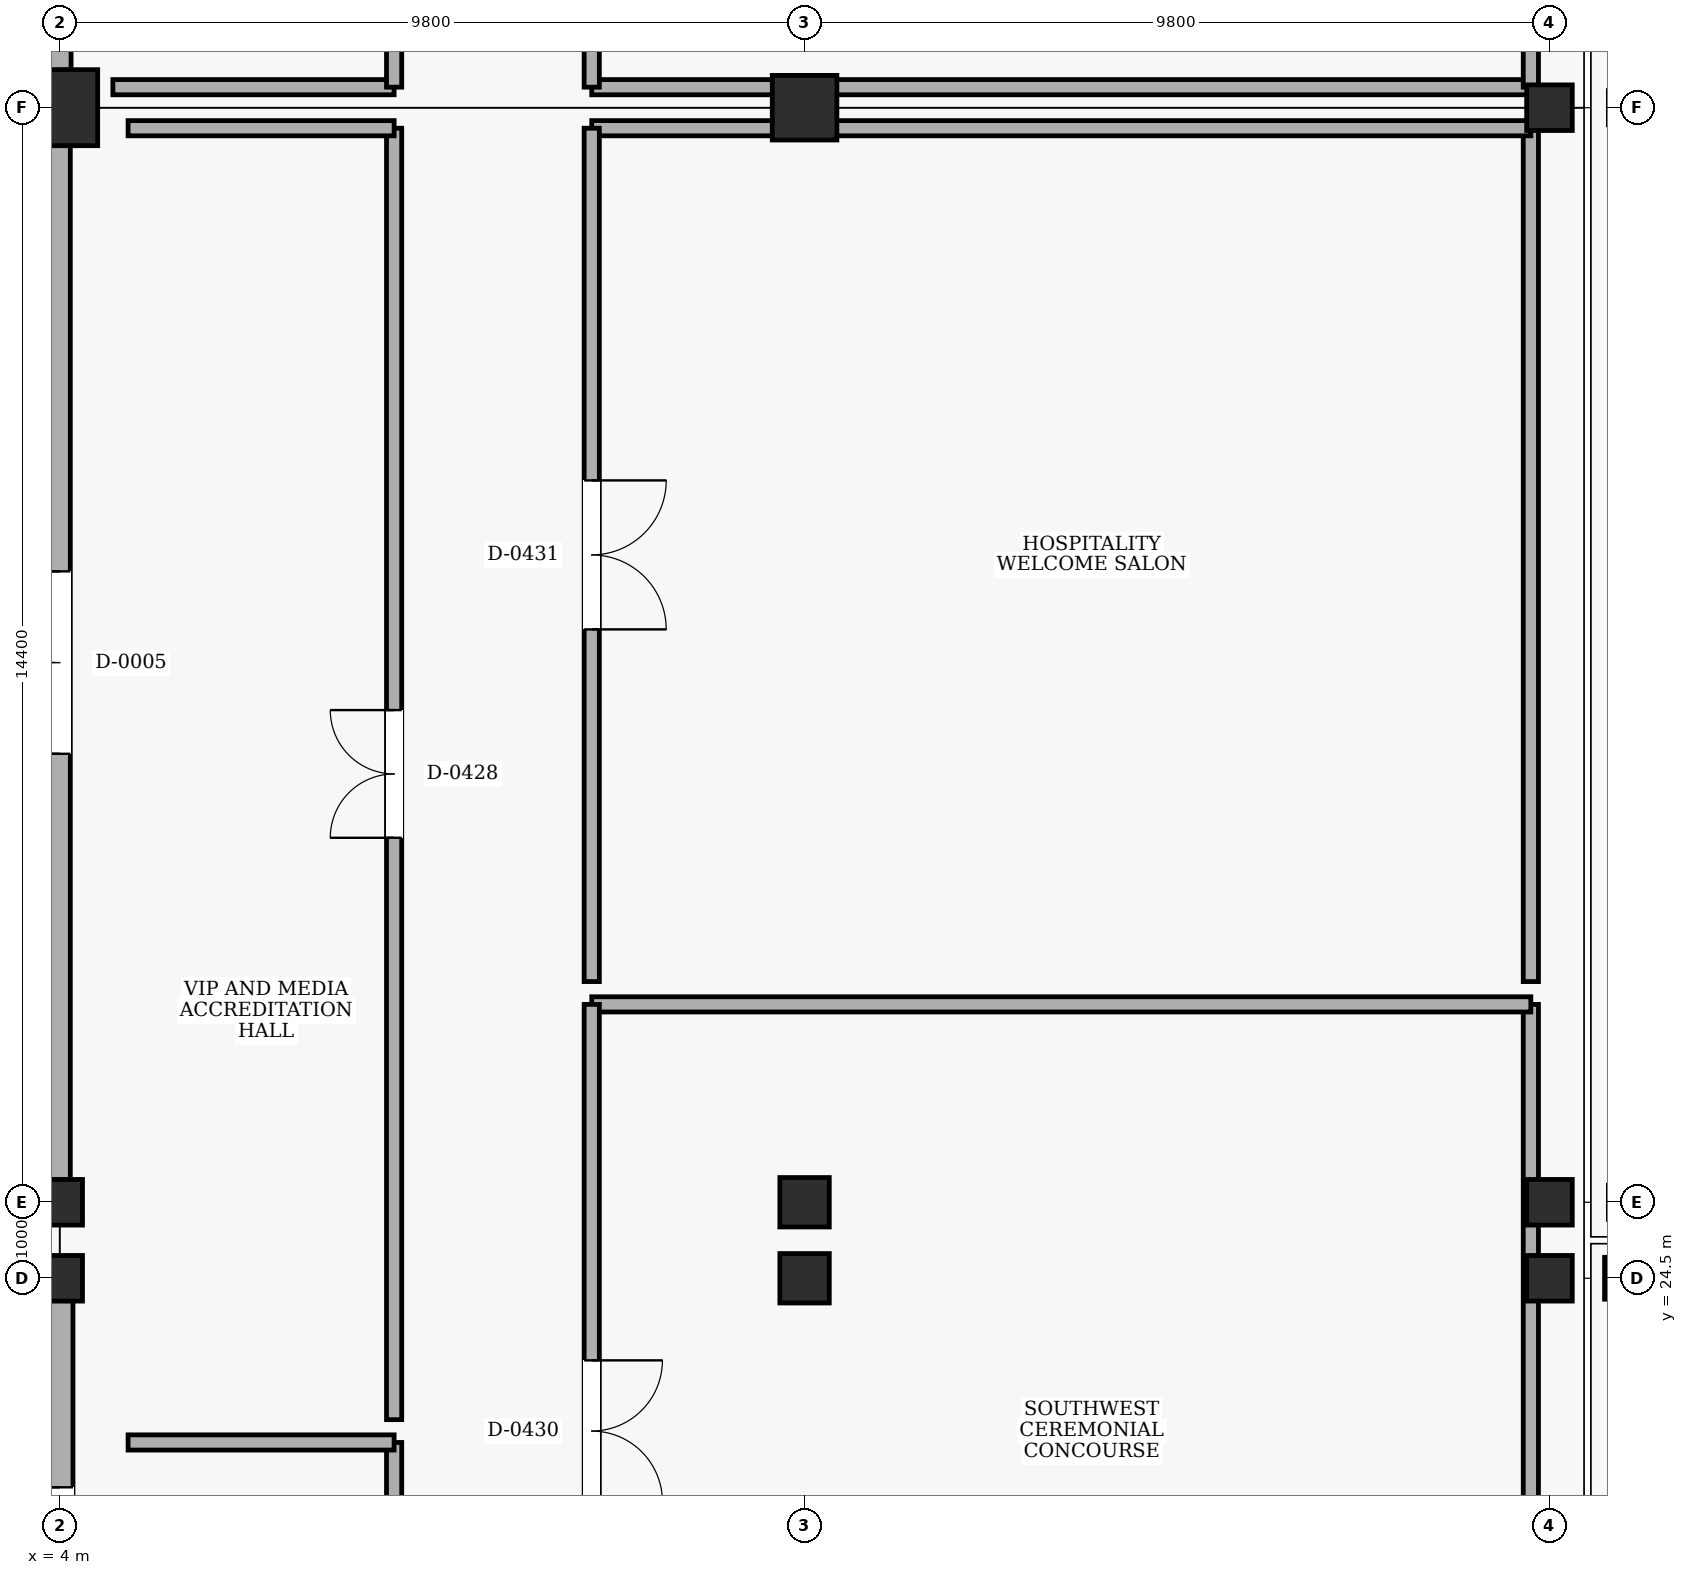
"""IFC4 building model, lengths in metres.
Left out: names, types, materials, properties, quantities, classifications, styles, units other than length and angle.
Written with IfcOpenShell. Run it as: python <this file> out.ifc"""

import sys

from ifc_helpers import new_model, si_unit, direction, frame, frame_2d, origin, origin_2d, place, context, subcontext, project, spatial, rectangle, extrude, element, fill, save


model = new_model("IFC4")
c1 = context("Model", 3, precision=1e-05, world=origin(), true_north=direction((0.0, 1.0)))
c2 = subcontext(c1, "Body", "Model", "MODEL_VIEW")
j1 = project(units=[si_unit("LENGTHUNIT", "METRE"), si_unit("PLANEANGLEUNIT", "RADIAN")], contexts=[c1])
p1 = place(None, origin())
s1 = spatial("IfcSite", under=j1, at=p1, CompositionType="ELEMENT")
p2 = place(p1, origin())
s2 = spatial("IfcBuilding", under=s1, at=p2, CompositionType="ELEMENT")
p3 = place(p2, origin())
s3 = spatial("IfcBuildingStorey", under=s2, at=p3, CompositionType="ELEMENT", Elevation=0.0)
for number, where, z_axis, x_axis in (
    (1, (4.0, 24.5, 0.0), (0.0, 0.0, 1.0), (1.0, 0.0, 0.0)),
    (2, (4.0, 25.5, 0.0), (0.0, 0.0, 1.0), (1.0, 0.0, 0.0)),
):
    element("IfcColumn", number, at=place(p3, frame(where, z_axis=z_axis, x_axis=x_axis)), inside=s3, PredefinedType="COLUMN", context=c2, shape_type="SweptSolid", body=[
        extrude(rectangle(XDim=0.6, YDim=0.6, at=origin_2d()), origin(), (0.0, 0.0, 1.0), 5.4),
    ])
p4 = place(p3, frame((4.0, 39.9, 0.0), z_axis=(0.0, 0.0, 1.0), x_axis=(1.0, 0.0, 0.0)))
e3 = element("IfcColumn", 3, at=p4, inside=s3, PredefinedType="COLUMN", context=c2, shape_type="SweptSolid", body=[
    extrude(rectangle(XDim=1.0, YDim=1.0, at=origin_2d()), origin(), (0.0, 0.0, 1.0), 5.4),
])
for number, where, z_axis, x_axis in (
    (4, (13.8, 24.5, 0.0), (0.0, 0.0, 1.0), (1.0, 0.0, 0.0)),
    (5, (13.8, 25.5, 0.0), (0.0, 0.0, 1.0), (1.0, 0.0, 0.0)),
):
    element("IfcColumn", number, at=place(p3, frame(where, z_axis=z_axis, x_axis=x_axis)), inside=s3, PredefinedType="COLUMN", context=c2, shape_type="SweptSolid", body=[
        extrude(rectangle(XDim=0.65, YDim=0.65, at=origin_2d()), origin(), (0.0, 0.0, 1.0), 5.4),
    ])
p5 = place(p3, frame((13.8, 39.9, 0.0), z_axis=(0.0, 0.0, 1.0), x_axis=(1.0, 0.0, 0.0)))
e6 = element("IfcColumn", 6, at=p5, inside=s3, PredefinedType="COLUMN", context=c2, shape_type="SweptSolid", body=[
    extrude(rectangle(XDim=0.85, YDim=0.85, at=origin_2d()), origin(), (0.0, 0.0, 1.0), 5.4),
])
for number, where, z_axis, x_axis in (
    (7, (23.6, 24.5, 0.0), (0.0, 0.0, 1.0), (1.0, 0.0, 0.0)),
    (8, (23.6, 25.5, 0.0), (0.0, 0.0, 1.0), (1.0, 0.0, 0.0)),
    (9, (23.6, 39.9, 0.0), (0.0, 0.0, 1.0), (1.0, 0.0, 0.0)),
):
    element("IfcColumn", number, at=place(p3, frame(where, z_axis=z_axis, x_axis=x_axis)), inside=s3, PredefinedType="COLUMN", context=c2, shape_type="SweptSolid", body=[
        extrude(rectangle(XDim=0.6, YDim=0.6, at=origin_2d()), origin(), (0.0, 0.0, 1.0), 5.4),
    ])
p6 = place(p3, frame((24.6, 24.5, 0.0), z_axis=(0.0, 0.0, 1.0), x_axis=(1.0, 0.0, 0.0)))
e10 = element("IfcColumn", 10, at=p6, inside=s3, PredefinedType="COLUMN", context=c2, shape_type="SweptSolid", body=[
    extrude(rectangle(XDim=0.55, YDim=0.55, at=origin_2d()), origin(), (0.0, 0.0, 1.0), 5.4),
])
p7 = place(p3, frame((4.0, 16.895, 0.0), z_axis=(0.0, 0.0, 1.0), x_axis=(0.0, 1.0, 0.0)))
e11 = element("IfcWall", 11, at=p7, inside=s3, PredefinedType="SOLIDWALL", context=c2, shape_type="SweptSolid", body=[
    extrude(rectangle(XDim=7.31, YDim=0.35, at=frame_2d((3.655, 0.0))), origin(), (0.0, 0.0, 1.0), 4.26),
])
p8 = place(p7, frame((2.455, 0.0, 0.0)))
e12 = element("IfcOpeningElement", 12, at=p8, cuts=e11, PredefinedType="OPENING", context=c2, shape_type="SweptSolid", body=[
    extrude(rectangle(XDim=2.4, YDim=2.2, at=frame_2d((1.2, 1.1))), frame((0.0, 0.185, 0.0), z_axis=(0.0, -1.0, 0.0), x_axis=(1.0, 0.0, 0.0)), (0.0, 0.0, 1.0), 0.37),
])
p9 = place(p3, frame((4.0, 25.795, 0.0), z_axis=(0.0, 0.0, 1.0), x_axis=(0.0, 1.0, 0.0)))
e13 = element("IfcWall", 13, at=p9, inside=s3, PredefinedType="SOLIDWALL", context=c2, shape_type="SweptSolid", body=[
    extrude(rectangle(XDim=13.61, YDim=0.28, at=frame_2d((6.805, 0.0))), origin(), (0.0, 0.0, 1.0), 4.61),
])
p10 = place(p9, frame((5.605, 0.0, 0.0)))
e14 = element("IfcOpeningElement", 14, at=p10, cuts=e13, PredefinedType="OPENING", context=c2, shape_type="SweptSolid", body=[
    extrude(rectangle(XDim=2.4, YDim=2.2, at=frame_2d((1.2, 1.1))), frame((0.0, 0.15, 0.0), z_axis=(0.0, -1.0, 0.0), x_axis=(1.0, 0.0, 0.0)), (0.0, 0.0, 1.0), 0.3),
])
p11 = place(p3, frame((4.0, 40.395, 0.0), z_axis=(0.0, 0.0, 1.0), x_axis=(0.0, 1.0, 0.0)))
e15 = element("IfcWall", 15, at=p11, inside=s3, PredefinedType="SOLIDWALL", context=c2, shape_type="SweptSolid", body=[
    extrude(rectangle(XDim=6.21, YDim=0.3, at=frame_2d((3.105, 0.0))), origin(), (0.0, 0.0, 1.0), 4.26),
])
p12 = place(p11, frame((1.905, 0.0, 0.0)))
e16 = element("IfcOpeningElement", 16, at=p12, cuts=e15, PredefinedType="OPENING", context=c2, shape_type="SweptSolid", body=[
    extrude(rectangle(XDim=2.4, YDim=2.2, at=frame_2d((1.2, 1.1))), frame((0.0, 0.16, 0.0), z_axis=(0.0, -1.0, 0.0), x_axis=(1.0, 0.0, 0.0)), (0.0, 0.0, 1.0), 0.32),
])
p13 = place(p3, frame((8.4, 5.35, 0.0), z_axis=(0.0, 0.0, 1.0), x_axis=(0.0, 1.0, 0.0)))
e17 = element("IfcWall", 17, at=p13, inside=s3, PredefinedType="PARTITIONING", context=c2, shape_type="SweptSolid", body=[
    extrude(rectangle(XDim=16.99, YDim=0.2, at=frame_2d((8.495, 0.0))), origin(), (0.0, 0.0, 1.0), 5.08),
])
p14 = place(p13, frame((7.72, 0.0, 0.0)))
e18 = element("IfcOpeningElement", 18, at=p14, cuts=e17, PredefinedType="OPENING", context=c2, shape_type="SweptSolid", body=[
    extrude(rectangle(XDim=1.55, YDim=2.2, at=frame_2d((0.775, 1.1))), frame((0.0, 0.11, 0.0), z_axis=(0.0, -1.0, 0.0), x_axis=(1.0, 0.0, 0.0)), (0.0, 0.0, 1.0), 0.22),
])
p15 = place(p3, frame((8.4, 22.34, 0.0), z_axis=(0.0, 0.0, 1.0), x_axis=(-1.0, 0.0, 0.0)))
e19 = element("IfcWall", 19, at=p15, inside=s3, PredefinedType="PARTITIONING", context=c2, shape_type="SweptSolid", body=[
    extrude(rectangle(XDim=3.5, YDim=0.2, at=frame_2d((1.75, 0.0))), origin(), (0.0, 0.0, 1.0), 5.08),
])
p16 = place(p3, frame((8.4, 22.64, 0.0), z_axis=(0.0, 0.0, 1.0), x_axis=(0.0, 1.0, 0.0)))
e20 = element("IfcWall", 20, at=p16, inside=s3, PredefinedType="PARTITIONING", context=c2, shape_type="SweptSolid", body=[
    extrude(rectangle(XDim=16.99, YDim=0.2, at=frame_2d((8.495, 0.0))), origin(), (0.0, 0.0, 1.0), 5.08),
])
p17 = place(p16, frame((7.655, 0.0, 0.0)))
e21 = element("IfcOpeningElement", 21, at=p17, cuts=e20, PredefinedType="OPENING", context=c2, shape_type="SweptSolid", body=[
    extrude(rectangle(XDim=1.68, YDim=2.25, at=frame_2d((0.84, 1.125))), frame((0.0, 0.11, 0.0), z_axis=(0.0, -1.0, 0.0), x_axis=(1.0, 0.0, 0.0)), (0.0, 0.0, 1.0), 0.22),
])
p18 = place(p3, frame((8.4, 39.63, 0.0), z_axis=(0.0, 0.0, 1.0), x_axis=(-1.0, 0.0, 0.0)))
e22 = element("IfcWall", 22, at=p18, inside=s3, PredefinedType="PARTITIONING", context=c2, shape_type="SweptSolid", body=[
    extrude(rectangle(XDim=3.5, YDim=0.2, at=frame_2d((1.75, 0.0))), origin(), (0.0, 0.0, 1.0), 4.21),
])
p19 = place(p3, frame((23.355, 16.877, 0.0), z_axis=(0.0, 0.0, 1.0), x_axis=(0.0, 1.0, 0.0)))
e23 = element("IfcWall", 23, at=p19, inside=s3, PredefinedType="PARTITIONING", context=c2, shape_type="SweptSolid", body=[
    extrude(rectangle(XDim=11.227, YDim=0.2, at=frame_2d((5.613, 0.0))), origin(), (0.0, 0.0, 1.0), 4.31),
])
p20 = place(p3, frame((23.355, 28.103, 0.0), z_axis=(0.0, 0.0, 1.0), x_axis=(-1.0, 0.0, 0.0)))
e24 = element("IfcWall", 24, at=p20, inside=s3, PredefinedType="PARTITIONING", context=c2, shape_type="SweptSolid", body=[
    extrude(rectangle(XDim=12.355, YDim=0.2, at=frame_2d((6.177, 0.0))), origin(), (0.0, 0.0, 1.0), 5.08),
])
p21 = place(p3, frame((11.0, 28.103, 0.0), z_axis=(0.0, 0.0, 1.0), x_axis=(0.0, -1.0, 0.0)))
e25 = element("IfcWall", 25, at=p21, inside=s3, PredefinedType="PARTITIONING", context=c2, shape_type="SweptSolid", body=[
    extrude(rectangle(XDim=11.227, YDim=0.2, at=frame_2d((5.613, 0.0))), origin(), (0.0, 0.0, 1.0), 5.08),
])
p22 = place(p21, frame((4.683, 0.0, 0.0)))
e26 = element("IfcOpeningElement", 26, at=p22, cuts=e25, PredefinedType="OPENING", context=c2, shape_type="SweptSolid", body=[
    extrude(rectangle(XDim=1.86, YDim=2.3, at=frame_2d((0.93, 1.15))), frame((0.0, 0.11, 0.0), z_axis=(0.0, -1.0, 0.0), x_axis=(1.0, 0.0, 0.0)), (0.0, 0.0, 1.0), 0.22),
])
p23 = place(p3, frame((23.355, 28.403, 0.0), z_axis=(0.0, 0.0, 1.0), x_axis=(0.0, 1.0, 0.0)))
e27 = element("IfcWall", 27, at=p23, inside=s3, PredefinedType="PARTITIONING", context=c2, shape_type="SweptSolid", body=[
    extrude(rectangle(XDim=11.227, YDim=0.2, at=frame_2d((5.613, 0.0))), origin(), (0.0, 0.0, 1.0), 4.61),
])
p24 = place(p3, frame((23.355, 39.63, 0.0), z_axis=(0.0, 0.0, 1.0), x_axis=(-1.0, 0.0, 0.0)))
e28 = element("IfcWall", 28, at=p24, inside=s3, PredefinedType="PARTITIONING", context=c2, shape_type="SweptSolid", body=[
    extrude(rectangle(XDim=12.355, YDim=0.2, at=frame_2d((6.177, 0.0))), origin(), (0.0, 0.0, 1.0), 4.21),
])
p25 = place(p3, frame((11.0, 39.63, 0.0), z_axis=(0.0, 0.0, 1.0), x_axis=(0.0, -1.0, 0.0)))
e29 = element("IfcWall", 29, at=p25, inside=s3, PredefinedType="PARTITIONING", context=c2, shape_type="SweptSolid", body=[
    extrude(rectangle(XDim=11.227, YDim=0.2, at=frame_2d((5.613, 0.0))), origin(), (0.0, 0.0, 1.0), 5.08),
])
p26 = place(p25, frame((4.633, 0.0, 0.0)))
e30 = element("IfcOpeningElement", 30, at=p26, cuts=e29, PredefinedType="OPENING", context=c2, shape_type="SweptSolid", body=[
    extrude(rectangle(XDim=1.96, YDim=2.3, at=frame_2d((0.98, 1.15))), frame((0.0, 0.11, 0.0), z_axis=(0.0, -1.0, 0.0), x_axis=(1.0, 0.0, 0.0)), (0.0, 0.0, 1.0), 0.22),
])
p27 = place(p3, frame((4.7, 40.17, 0.0), z_axis=(0.0, 0.0, 1.0), x_axis=(1.0, 0.0, 0.0)))
e31 = element("IfcWall", 31, at=p27, inside=s3, PredefinedType="PARTITIONING", context=c2, shape_type="SweptSolid", body=[
    extrude(rectangle(XDim=3.7, YDim=0.2, at=frame_2d((1.85, 0.0))), origin(), (0.0, 0.0, 1.0), 4.21),
])
p28 = place(p3, frame((8.4, 40.17, 0.0), z_axis=(0.0, 0.0, 1.0), x_axis=(0.0, 1.0, 0.0)))
e32 = element("IfcWall", 32, at=p28, inside=s3, PredefinedType="PARTITIONING", context=c2, shape_type="SweptSolid", body=[
    extrude(rectangle(XDim=9.05, YDim=0.2, at=frame_2d((4.525, 0.0))), origin(), (0.0, 0.0, 1.0), 5.08),
])
p29 = place(p28, frame((3.485, 0.0, 0.0)))
e33 = element("IfcOpeningElement", 33, at=p29, cuts=e32, PredefinedType="OPENING", context=c2, shape_type="SweptSolid", body=[
    extrude(rectangle(XDim=2.08, YDim=2.35, at=frame_2d((1.04, 1.175))), frame((0.0, 0.11, 0.0), z_axis=(0.0, -1.0, 0.0), x_axis=(1.0, 0.0, 0.0)), (0.0, 0.0, 1.0), 0.22),
])
p30 = place(p3, frame((11.0, 40.17, 0.0), z_axis=(0.0, 0.0, 1.0), x_axis=(1.0, 0.0, 0.0)))
e34 = element("IfcWall", 34, at=p30, inside=s3, PredefinedType="PARTITIONING", context=c2, shape_type="SweptSolid", body=[
    extrude(rectangle(XDim=12.355, YDim=0.2, at=frame_2d((6.177, 0.0))), origin(), (0.0, 0.0, 1.0), 4.21),
])
p31 = place(p3, frame((23.355, 40.17, 0.0), z_axis=(0.0, 0.0, 1.0), x_axis=(0.0, 1.0, 0.0)))
e35 = element("IfcWall", 35, at=p31, inside=s3, PredefinedType="PARTITIONING", context=c2, shape_type="SweptSolid", body=[
    extrude(rectangle(XDim=9.05, YDim=0.2, at=frame_2d((4.525, 0.0))), origin(), (0.0, 0.0, 1.0), 4.31),
])
p32 = place(p3, frame((11.0, 49.22, 0.0), z_axis=(0.0, 0.0, 1.0), x_axis=(0.0, -1.0, 0.0)))
e36 = element("IfcWall", 36, at=p32, inside=s3, PredefinedType="PARTITIONING", context=c2, shape_type="SweptSolid", body=[
    extrude(rectangle(XDim=9.05, YDim=0.2, at=frame_2d((4.525, 0.0))), origin(), (0.0, 0.0, 1.0), 5.08),
])
p33 = place(p8, origin())
e37 = element("IfcDoor", 37, at=p33, inside=s3, OperationType="DOUBLE_DOOR_SINGLE_SWING", PredefinedType="DOOR", context=c2, shape_type="SweptSolid", body=[
    extrude(rectangle(XDim=2.4, YDim=2.2, at=frame_2d((1.2, 1.1))), frame((0.0, 0.025, 0.0), z_axis=(0.0, -1.0, 0.0), x_axis=(1.0, 0.0, 0.0)), (0.0, 0.0, 1.0), 0.05),
])
fill(e12, e37)
p34 = place(p10, origin())
e38 = element("IfcDoor", 38, at=p34, inside=s3, OperationType="DOUBLE_DOOR_SINGLE_SWING", PredefinedType="DOOR", context=c2, shape_type="SweptSolid", body=[
    extrude(rectangle(XDim=2.4, YDim=2.2, at=frame_2d((1.2, 1.1))), frame((0.0, 0.025, 0.0), z_axis=(0.0, -1.0, 0.0), x_axis=(1.0, 0.0, 0.0)), (0.0, 0.0, 1.0), 0.05),
])
fill(e14, e38)
p35 = place(p17, origin())
e39 = element("IfcDoor", 39, at=p35, inside=s3, OperationType="DOUBLE_DOOR_SINGLE_SWING", PredefinedType="DOOR", context=c2, shape_type="SweptSolid", body=[
    extrude(rectangle(XDim=1.68, YDim=2.25, at=frame_2d((0.84, 1.125))), frame((0.0, 0.025, 0.0), z_axis=(0.0, -1.0, 0.0), x_axis=(1.0, 0.0, 0.0)), (0.0, 0.0, 1.0), 0.05),
])
fill(e21, e39)
p36 = place(p22, origin())
e40 = element("IfcDoor", 40, at=p36, inside=s3, OperationType="DOUBLE_DOOR_SINGLE_SWING", PredefinedType="DOOR", context=c2, shape_type="SweptSolid", body=[
    extrude(rectangle(XDim=1.86, YDim=2.3, at=frame_2d((0.93, 1.15))), frame((0.0, 0.025, 0.0), z_axis=(0.0, -1.0, 0.0), x_axis=(1.0, 0.0, 0.0)), (0.0, 0.0, 1.0), 0.05),
])
fill(e26, e40)
p37 = place(p26, origin())
e41 = element("IfcDoor", 41, at=p37, inside=s3, OperationType="DOUBLE_DOOR_SINGLE_SWING", PredefinedType="DOOR", context=c2, shape_type="SweptSolid", body=[
    extrude(rectangle(XDim=1.96, YDim=2.3, at=frame_2d((0.98, 1.15))), frame((0.0, 0.025, 0.0), z_axis=(0.0, -1.0, 0.0), x_axis=(1.0, 0.0, 0.0)), (0.0, 0.0, 1.0), 0.05),
])
fill(e30, e41)
save(model, sys.argv[1])
